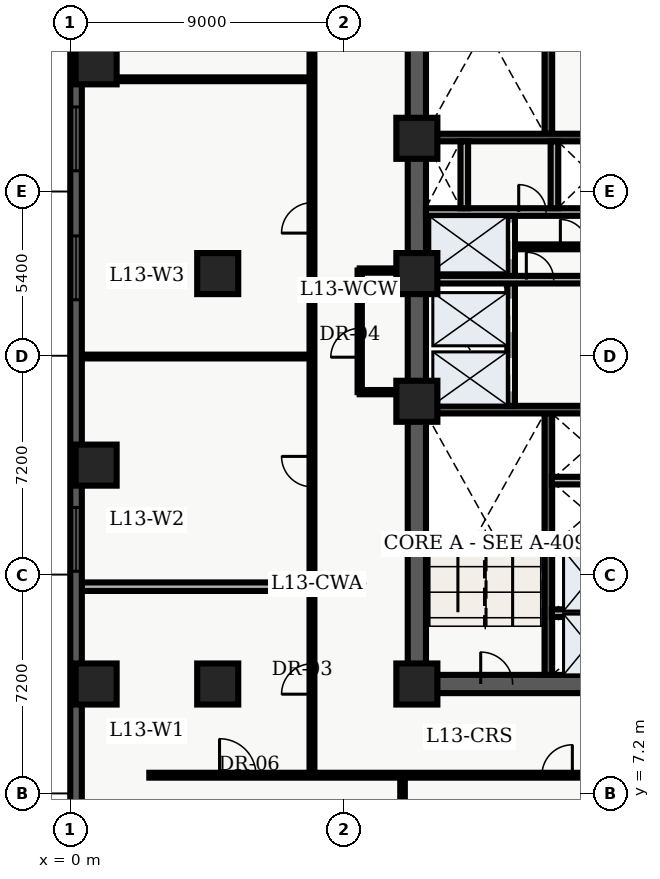
"""IFC4 building model, lengths in metres.
Left out: names, types, materials, properties, quantities, classifications, styles, units other than length and angle.
Written with IfcOpenShell. Run it as: python <this file> out.ifc"""

import sys

from ifc_helpers import new_model, entity, si_unit, converted_unit, direction, frame, origin_with_axes, origin_2d_with_axis, place, context, subcontext, project, spatial, polyline, rectangle, outline, extrude, element, fill, save


model = new_model("IFC4")
c1 = context("Model", 3, precision=1e-05, world=origin_with_axes(), true_north=direction((0.0, 1.0)))
c2 = subcontext(c1, "Body", "Model", "MODEL_VIEW")
j1 = project(units=[si_unit("LENGTHUNIT", "METRE"), converted_unit("PLANEANGLEUNIT", "DEGREE", entity("IfcPlaneAngleMeasure", 0.017), si_unit("PLANEANGLEUNIT", "RADIAN"), dimensions=[0, 0, 0, 0, 0, 0, 0])], contexts=[c1])
p1 = place(None, origin_with_axes())
s1 = spatial("IfcSite", under=j1, at=p1, CompositionType="ELEMENT")
p2 = place(p1, origin_with_axes())
s2 = spatial("IfcBuilding", under=s1, at=p2, CompositionType="ELEMENT")
p3 = place(p2, frame((0.0, 0.0, 56.1), z_axis=(0.0, 0.0, 1.0), x_axis=(1.0, 0.0, 0.0)))
s3 = spatial("IfcBuildingStorey", under=s2, at=p3, CompositionType="ELEMENT", Elevation=56.1)
p4 = place(p3, frame((11.4, 10.8, 0.0), z_axis=(0.0, 0.0, 1.0), x_axis=(0.0, 1.0, 0.0)))
e1 = element("IfcWall", 1, at=p4, inside=s3, PredefinedType="SHEAR", context=c2, shape_type="SweptSolid", body=[
    extrude(outline(polyline([(0.0, -0.3), (27.0, -0.3), (27.0, 0.3), (0.0, 0.3), (0.0, -0.3)])), origin_with_axes(), (0.0, 0.0, 1.0), 3.66),
])
p5 = place(p3, frame((11.4, 10.8, 0.0), z_axis=(0.0, 0.0, 1.0), x_axis=(1.0, 0.0, 0.0)))
e2 = element("IfcWall", 2, at=p5, inside=s3, PredefinedType="SHEAR", context=c2, shape_type="SweptSolid", body=[
    extrude(outline(polyline([(0.0, -0.3), (7.2, -0.3), (7.2, 0.3), (0.0, 0.3), (0.0, -0.3)])), origin_with_axes(), (0.0, 0.0, 1.0), 3.66),
])
p6 = place(p5, frame((2.625, 0.0, 0.0), z_axis=(0.0, 0.0, 1.0), x_axis=(1.0, 0.0, 0.0)))
e3 = element("IfcOpeningElement", 3, at=p6, cuts=e2, PredefinedType="OPENING", context=c2, shape_type="SweptSolid", body=[
    extrude(rectangle(XDim=1.05, YDim=0.62, at=origin_2d_with_axis()), origin_with_axes(), (0.0, 0.0, 1.0), 2.15),
])
p7 = place(p3, frame((15.725, 11.1, 0.0), z_axis=(0.0, 0.0, 1.0), x_axis=(0.0, 1.0, 0.0)))
e4 = element("IfcWall", 4, at=p7, inside=s3, PredefinedType="SHEAR", context=c2, shape_type="SweptSolid", body=[
    extrude(outline(polyline([(0.0, -0.125), (8.6, -0.125), (8.6, 0.125), (0.0, 0.125), (0.0, -0.125)])), origin_with_axes(), (0.0, 0.0, 1.0), 3.66),
])
p8 = place(p3, frame((11.7, 19.825, 0.0), z_axis=(0.0, 0.0, 1.0), x_axis=(1.0, 0.0, 0.0)))
e5 = element("IfcWall", 5, at=p8, inside=s3, PredefinedType="SHEAR", context=c2, shape_type="SweptSolid", body=[
    extrude(outline(polyline([(0.0, -0.125), (6.6, -0.125), (6.6, 0.125), (0.0, 0.125), (0.0, -0.125)])), origin_with_axes(), (0.0, 0.0, 1.0), 3.66),
])
p9 = place(p3, frame((15.725, 28.9, 0.0), z_axis=(0.0, 0.0, 1.0), x_axis=(0.0, 1.0, 0.0)))
e6 = element("IfcWall", 6, at=p9, inside=s3, PredefinedType="SHEAR", context=c2, shape_type="SweptSolid", body=[
    extrude(outline(polyline([(0.0, -0.125), (8.6, -0.125), (8.6, 0.125), (0.0, 0.125), (0.0, -0.125)])), origin_with_axes(), (0.0, 0.0, 1.0), 3.66),
])
p10 = place(p3, frame((11.7, 28.775, 0.0), z_axis=(0.0, 0.0, 1.0), x_axis=(1.0, 0.0, 0.0)))
e7 = element("IfcWall", 7, at=p10, inside=s3, PredefinedType="SHEAR", context=c2, shape_type="SweptSolid", body=[
    extrude(outline(polyline([(0.0, -0.125), (6.6, -0.125), (6.6, 0.125), (0.0, 0.125), (0.0, -0.125)])), origin_with_axes(), (0.0, 0.0, 1.0), 3.66),
])
p11 = place(p3, frame((14.5, 19.95, 0.0), z_axis=(0.0, 0.0, 1.0), x_axis=(0.0, 1.0, 0.0)))
e8 = element("IfcWall", 8, at=p11, inside=s3, PredefinedType="SOLIDWALL", context=c2, shape_type="SweptSolid", body=[
    extrude(outline(polyline([(0.0, -0.125), (6.25, -0.125), (6.25, 0.125), (0.0, 0.125), (0.0, -0.125)])), origin_with_axes(), (0.0, 0.0, 1.0), 2.7),
])
p12 = place(p11, frame((1.025, 0.0, 0.0), z_axis=(0.0, 0.0, 1.0), x_axis=(1.0, 0.0, 0.0)))
e9 = element("IfcOpeningElement", 9, at=p12, cuts=e8, PredefinedType="OPENING", context=c2, shape_type="SweptSolid", body=[
    extrude(rectangle(XDim=1.1, YDim=0.27, at=origin_2d_with_axis()), origin_with_axes(), (0.0, 0.0, 1.0), 2.15),
])
p13 = place(p11, frame((2.975, 0.0, 0.0), z_axis=(0.0, 0.0, 1.0), x_axis=(1.0, 0.0, 0.0)))
e10 = element("IfcOpeningElement", 10, at=p13, cuts=e8, PredefinedType="OPENING", context=c2, shape_type="SweptSolid", body=[
    extrude(rectangle(XDim=1.1, YDim=0.27, at=origin_2d_with_axis()), origin_with_axes(), (0.0, 0.0, 1.0), 2.15),
])
p14 = place(p11, frame((5.425, 0.0, 0.0), z_axis=(0.0, 0.0, 1.0), x_axis=(1.0, 0.0, 0.0)))
e11 = element("IfcOpeningElement", 11, at=p14, cuts=e8, PredefinedType="OPENING", context=c2, shape_type="SweptSolid", body=[
    extrude(rectangle(XDim=1.2, YDim=0.27, at=origin_2d_with_axis()), origin_with_axes(), (0.0, 0.0, 1.0), 2.15),
])
p15 = place(p3, frame((11.7, 24.1, 0.0), z_axis=(0.0, 0.0, 1.0), x_axis=(1.0, 0.0, 0.0)))
e12 = element("IfcWall", 12, at=p15, inside=s3, PredefinedType="SOLIDWALL", context=c2, shape_type="SweptSolid", body=[
    extrude(outline(polyline([(0.0, -0.125), (6.6, -0.125), (6.6, 0.125), (0.0, 0.125), (0.0, -0.125)])), origin_with_axes(), (0.0, 0.0, 1.0), 2.7),
])
p16 = place(p15, frame((3.75, 0.0, 0.0), z_axis=(0.0, 0.0, 1.0), x_axis=(1.0, 0.0, 0.0)))
e13 = element("IfcOpeningElement", 13, at=p16, cuts=e12, PredefinedType="OPENING", context=c2, shape_type="SweptSolid", body=[
    extrude(rectangle(XDim=0.9, YDim=0.27, at=origin_2d_with_axis()), origin_with_axes(), (0.0, 0.0, 1.0), 2.15),
])
p17 = place(p3, frame((11.7, 26.325, 0.0), z_axis=(0.0, 0.0, 1.0), x_axis=(1.0, 0.0, 0.0)))
e14 = element("IfcWall", 14, at=p17, inside=s3, PredefinedType="SOLIDWALL", context=c2, shape_type="SweptSolid", body=[
    extrude(outline(polyline([(0.0, -0.125), (6.6, -0.125), (6.6, 0.125), (0.0, 0.125), (0.0, -0.125)])), origin_with_axes(), (0.0, 0.0, 1.0), 2.7),
])
p18 = place(p17, frame((3.5, 0.0, 0.0), z_axis=(0.0, 0.0, 1.0), x_axis=(1.0, 0.0, 0.0)))
e15 = element("IfcOpeningElement", 15, at=p18, cuts=e14, PredefinedType="OPENING", context=c2, shape_type="SweptSolid", body=[
    extrude(rectangle(XDim=0.9, YDim=0.27, at=origin_2d_with_axis()), origin_with_axes(), (0.0, 0.0, 1.0), 2.15),
])
for number, where, z_axis, x_axis in (
    (16, (12.96, 26.45, 0.0), (0.0, 0.0, 1.0), (0.0, 1.0, 0.0)),
    (17, (15.925, 26.45, 0.0), (0.0, 0.0, 1.0), (0.0, 1.0, 0.0)),
):
    element("IfcWall", number, at=place(p3, frame(where, z_axis=z_axis, x_axis=x_axis)), inside=s3, PredefinedType="SOLIDWALL", context=c2, shape_type="SweptSolid", body=[
        extrude(outline(polyline([(0.0, -0.125), (2.2, -0.125), (2.2, 0.125), (0.0, 0.125), (0.0, -0.125)])), origin_with_axes(), (0.0, 0.0, 1.0), 2.7),
    ])
for number, where, z_axis, x_axis in (
    (18, (11.4, 10.8, 0.0), (0.0, 0.0, 1.0), (1.0, 0.0, 0.0)),
    (19, (11.4, 20.1, 0.0), (0.0, 0.0, 1.0), (1.0, 0.0, 0.0)),
    (20, (11.4, 24.3, 0.0), (0.0, 0.0, 1.0), (1.0, 0.0, 0.0)),
    (21, (11.4, 28.75, 0.0), (0.0, 0.0, 1.0), (1.0, 0.0, 0.0)),
    (22, (4.85, 10.8, 0.0), (0.0, 0.0, 1.0), (1.0, 0.0, 0.0)),
    (23, (4.85, 24.3, 0.0), (0.0, 0.0, 1.0), (1.0, 0.0, 0.0)),
    (24, (0.85, 10.8, 0.0), (0.0, 0.0, 1.0), (1.0, 0.0, 0.0)),
    (25, (0.85, 18.0, 0.0), (0.0, 0.0, 1.0), (1.0, 0.0, 0.0)),
    (26, (0.85, 31.2, 0.0), (0.0, 0.0, 1.0), (1.0, 0.0, 0.0)),
):
    element("IfcColumn", number, at=place(p3, frame(where, z_axis=z_axis, x_axis=x_axis)), inside=s3, PredefinedType="COLUMN", context=c2, shape_type="SweptSolid", body=[
        extrude(rectangle(XDim=1.35, YDim=1.35, at=origin_2d_with_axis()), origin_with_axes(), (0.0, 0.0, 1.0), 3.9),
    ])
p19 = place(p3, frame((14.62, 25.18, 0.0), z_axis=(0.0, 0.0, 1.0), x_axis=(1.0, 0.0, 0.0)))
e27 = element("IfcWall", 27, at=p19, inside=s3, PredefinedType="PARTITIONING", context=c2, shape_type="SweptSolid", body=[
    extrude(outline(polyline([(0.0, -0.08), (3.68, -0.08), (3.68, 0.08), (0.0, 0.08), (0.0, -0.08)])), origin_with_axes(), (0.0, 0.0, 1.0), 2.7),
])
p20 = place(p19, frame((1.95, 0.0, 0.0), z_axis=(0.0, 0.0, 1.0), x_axis=(1.0, 0.0, 0.0)))
e28 = element("IfcOpeningElement", 28, at=p20, cuts=e27, PredefinedType="OPENING", context=c2, shape_type="SweptSolid", body=[
    extrude(rectangle(XDim=0.9, YDim=0.18, at=origin_2d_with_axis()), origin_with_axes(), (0.0, 0.0, 1.0), 2.15),
])
for number, where, z_axis, x_axis in (
    (29, (15.84, 13.13, 0.0), (0.0, 0.0, 1.0), (1.0, 0.0, 0.0)),
    (30, (15.84, 15.29, 0.0), (0.0, 0.0, 1.0), (1.0, 0.0, 0.0)),
    (31, (15.84, 17.49, 0.0), (0.0, 0.0, 1.0), (1.0, 0.0, 0.0)),
):
    element("IfcWall", number, at=place(p3, frame(where, z_axis=z_axis, x_axis=x_axis)), inside=s3, PredefinedType="SOLIDWALL", context=c2, shape_type="SweptSolid", body=[
        extrude(outline(polyline([(0.0, -0.125), (2.46, -0.125), (2.46, 0.125), (0.0, 0.125), (0.0, -0.125)])), origin_with_axes(), (0.0, 0.0, 1.0), 2.7),
    ])
p21 = place(p3, frame((9.52, 20.4, 0.0), z_axis=(0.0, 0.0, 1.0), x_axis=(0.0, 1.0, 0.0)))
e32 = element("IfcWall", 32, at=p21, inside=s3, PredefinedType="PARTITIONING", context=c2, shape_type="SweptSolid", body=[
    extrude(outline(polyline([(0.0, -0.07), (4.0, -0.07), (4.0, 0.07), (0.0, 0.07), (0.0, -0.07)])), origin_with_axes(), (0.0, 0.0, 1.0), 2.7),
])
p22 = place(p21, frame((1.625, 0.0, 0.0), z_axis=(0.0, 0.0, 1.0), x_axis=(1.0, 0.0, 0.0)))
e33 = element("IfcOpeningElement", 33, at=p22, cuts=e32, PredefinedType="OPENING", context=c2, shape_type="SweptSolid", body=[
    extrude(rectangle(XDim=0.95, YDim=0.16, at=origin_2d_with_axis()), origin_with_axes(), (0.0, 0.0, 1.0), 2.15),
])
for number, where, z_axis, x_axis in (
    (34, (9.52, 20.4, 0.0), (0.0, 0.0, 1.0), (1.0, 0.0, 0.0)),
    (35, (9.52, 24.4, 0.0), (0.0, 0.0, 1.0), (1.0, 0.0, 0.0)),
):
    element("IfcWall", number, at=place(p3, frame(where, z_axis=z_axis, x_axis=x_axis)), inside=s3, PredefinedType="PARTITIONING", context=c2, shape_type="SweptSolid", body=[
        extrude(outline(polyline([(0.0, -0.07), (1.58, -0.07), (1.58, 0.07), (0.0, 0.07), (0.0, -0.07)])), origin_with_axes(), (0.0, 0.0, 1.0), 2.7),
    ])
p23 = place(p3, frame((2.6, 7.8, 0.0), z_axis=(0.0, 0.0, 1.0), x_axis=(1.0, 0.0, 0.0)))
e36 = element("IfcWall", 36, at=p23, inside=s3, PredefinedType="PARTITIONING", context=c2, shape_type="SweptSolid", body=[
    extrude(outline(polyline([(0.0, -0.08), (18.55, -0.08), (18.55, 0.08), (0.0, 0.08), (0.0, -0.08)])), origin_with_axes(), (0.0, 0.0, 1.0), 2.7),
])
p24 = place(p23, frame((2.91, 0.0, 0.0), z_axis=(0.0, 0.0, 1.0), x_axis=(1.0, 0.0, 0.0)))
e37 = element("IfcOpeningElement", 37, at=p24, cuts=e36, PredefinedType="OPENING", context=c2, shape_type="SweptSolid", body=[
    extrude(rectangle(XDim=1.2, YDim=0.18, at=origin_2d_with_axis()), origin_with_axes(), (0.0, 0.0, 1.0), 2.2),
])
p25 = place(p23, frame((13.415, 0.0, 0.0), z_axis=(0.0, 0.0, 1.0), x_axis=(1.0, 0.0, 0.0)))
e38 = element("IfcOpeningElement", 38, at=p25, cuts=e36, PredefinedType="OPENING", context=c2, shape_type="SweptSolid", body=[
    extrude(rectangle(XDim=1.0, YDim=0.18, at=origin_2d_with_axis()), origin_with_axes(), (0.0, 0.0, 1.0), 2.15),
])
p26 = place(p3, frame((7.95, 7.8, 0.0), z_axis=(0.0, 0.0, 1.0), x_axis=(0.0, 1.0, 0.0)))
e39 = element("IfcWall", 39, at=p26, inside=s3, PredefinedType="PARTITIONING", context=c2, shape_type="SweptSolid", body=[
    extrude(outline(polyline([(0.0, -0.08), (32.7, -0.08), (32.7, 0.08), (0.0, 0.08), (0.0, -0.08)])), origin_with_axes(), (0.0, 0.0, 1.0), 2.7),
])
p27 = place(p26, frame((3.166, 0.0, 0.0), z_axis=(0.0, 0.0, 1.0), x_axis=(1.0, 0.0, 0.0)))
e40 = element("IfcOpeningElement", 40, at=p27, cuts=e39, PredefinedType="OPENING", context=c2, shape_type="SweptSolid", body=[
    extrude(rectangle(XDim=1.0, YDim=0.18, at=origin_2d_with_axis()), origin_with_axes(), (0.0, 0.0, 1.0), 2.15),
])
p28 = place(p26, frame((9.986, 0.0, 0.0), z_axis=(0.0, 0.0, 1.0), x_axis=(1.0, 0.0, 0.0)))
e41 = element("IfcOpeningElement", 41, at=p28, cuts=e39, PredefinedType="OPENING", context=c2, shape_type="SweptSolid", body=[
    extrude(rectangle(XDim=1.0, YDim=0.18, at=origin_2d_with_axis()), origin_with_axes(), (0.0, 0.0, 1.0), 2.15),
])
p29 = place(p26, frame((18.332, 0.0, 0.0), z_axis=(0.0, 0.0, 1.0), x_axis=(1.0, 0.0, 0.0)))
e42 = element("IfcOpeningElement", 42, at=p29, cuts=e39, PredefinedType="OPENING", context=c2, shape_type="SweptSolid", body=[
    extrude(rectangle(XDim=1.0, YDim=0.18, at=origin_2d_with_axis()), origin_with_axes(), (0.0, 0.0, 1.0), 2.15),
])
p30 = place(p26, frame((25.088, 0.0, 0.0), z_axis=(0.0, 0.0, 1.0), x_axis=(1.0, 0.0, 0.0)))
e43 = element("IfcOpeningElement", 43, at=p30, cuts=e39, PredefinedType="OPENING", context=c2, shape_type="SweptSolid", body=[
    extrude(rectangle(XDim=1.0, YDim=0.18, at=origin_2d_with_axis()), origin_with_axes(), (0.0, 0.0, 1.0), 2.15),
])
p31 = place(p26, frame((29.927, 0.0, 0.0), z_axis=(0.0, 0.0, 1.0), x_axis=(1.0, 0.0, 0.0)))
e44 = element("IfcOpeningElement", 44, at=p31, cuts=e39, PredefinedType="OPENING", context=c2, shape_type="SweptSolid", body=[
    extrude(rectangle(XDim=1.0, YDim=0.18, at=origin_2d_with_axis()), origin_with_axes(), (0.0, 0.0, 1.0), 2.15),
])
p32 = place(p3, frame((0.375, 14.001, 0.0), z_axis=(0.0, 0.0, 1.0), x_axis=(1.0, 0.0, 0.0)))
e45 = element("IfcWall", 45, at=p32, inside=s3, PredefinedType="PARTITIONING", context=c2, shape_type="SweptSolid", body=[
    extrude(outline(polyline([(0.0, -0.14), (7.455, -0.14), (7.455, 0.14), (0.0, 0.14), (0.0, -0.14)])), origin_with_axes(), (0.0, 0.0, 1.0), 2.7),
])
for number, where, z_axis, x_axis in (
    (46, (0.375, 21.572, 0.0), (0.0, 0.0, 1.0), (1.0, 0.0, 0.0)),
    (47, (0.375, 30.692, 0.0), (0.0, 0.0, 1.0), (1.0, 0.0, 0.0)),
):
    element("IfcWall", number, at=place(p3, frame(where, z_axis=z_axis, x_axis=x_axis)), inside=s3, PredefinedType="PARTITIONING", context=c2, shape_type="SweptSolid", body=[
        extrude(outline(polyline([(0.0, -0.062), (7.455, -0.062), (7.455, 0.062), (0.0, 0.062), (0.0, -0.062)])), origin_with_axes(), (0.0, 0.0, 1.0), 2.7),
    ])
p33 = place(p3, frame((10.929, 0.36, 0.0), z_axis=(0.0, 0.0, 1.0), x_axis=(0.0, 1.0, 0.0)))
e48 = element("IfcWall", 48, at=p33, inside=s3, PredefinedType="PARTITIONING", context=c2, shape_type="SweptSolid", body=[
    extrude(outline(polyline([(0.0, -0.075), (7.34, -0.075), (7.34, 0.075), (0.0, 0.075), (0.0, -0.075)])), origin_with_axes(), (0.0, 0.0, 1.0), 2.7),
])
p34 = place(p3, frame((0.19, 2.78, 0.0), z_axis=(0.0, 0.0, 1.0), x_axis=(0.0, 1.0, 0.0)))
e49 = element("IfcWall", 49, at=p34, inside=s3, PredefinedType="SOLIDWALL", context=c2, shape_type="SweptSolid", body=[
    extrude(outline(polyline([(0.0, -0.19), (43.42, -0.19), (43.42, 0.19), (0.0, 0.19), (0.0, -0.19)])), origin_with_axes(), (0.0, 0.0, 1.0), 3.66),
])
p35 = place(p34, frame((2.946, 0.0, 0.45), z_axis=(0.0, 0.0, 1.0), x_axis=(1.0, 0.0, 0.0)))
e50 = element("IfcOpeningElement", 50, at=p35, cuts=e49, PredefinedType="OPENING", context=c2, shape_type="SweptSolid", body=[
    extrude(rectangle(XDim=2.1, YDim=0.4, at=origin_2d_with_axis()), origin_with_axes(), (0.0, 0.0, 1.0), 2.2),
])
p36 = place(p34, frame((12.778, 0.0, 0.45), z_axis=(0.0, 0.0, 1.0), x_axis=(1.0, 0.0, 0.0)))
e51 = element("IfcOpeningElement", 51, at=p36, cuts=e49, PredefinedType="OPENING", context=c2, shape_type="SweptSolid", body=[
    extrude(rectangle(XDim=2.1, YDim=0.4, at=origin_2d_with_axis()), origin_with_axes(), (0.0, 0.0, 1.0), 2.2),
])
p37 = place(p34, frame((21.71, 0.0, 0.45), z_axis=(0.0, 0.0, 1.0), x_axis=(1.0, 0.0, 0.0)))
e52 = element("IfcOpeningElement", 52, at=p37, cuts=e49, PredefinedType="OPENING", context=c2, shape_type="SweptSolid", body=[
    extrude(rectangle(XDim=2.1, YDim=0.4, at=origin_2d_with_axis()), origin_with_axes(), (0.0, 0.0, 1.0), 2.2),
])
p38 = place(p34, frame((25.951, 0.0, 0.45), z_axis=(0.0, 0.0, 1.0), x_axis=(1.0, 0.0, 0.0)))
e53 = element("IfcOpeningElement", 53, at=p38, cuts=e49, PredefinedType="OPENING", context=c2, shape_type="SweptSolid", body=[
    extrude(rectangle(XDim=2.1, YDim=0.4, at=origin_2d_with_axis()), origin_with_axes(), (0.0, 0.0, 1.0), 2.2),
])
p39 = place(p34, frame((30.642, 0.0, 0.45), z_axis=(0.0, 0.0, 1.0), x_axis=(1.0, 0.0, 0.0)))
e54 = element("IfcOpeningElement", 54, at=p39, cuts=e49, PredefinedType="OPENING", context=c2, shape_type="SweptSolid", body=[
    extrude(rectangle(XDim=2.1, YDim=0.4, at=origin_2d_with_axis()), origin_with_axes(), (0.0, 0.0, 1.0), 2.2),
])
p40 = place(p34, frame((40.024, 0.0, 0.45), z_axis=(0.0, 0.0, 1.0), x_axis=(1.0, 0.0, 0.0)))
e55 = element("IfcOpeningElement", 55, at=p40, cuts=e49, PredefinedType="OPENING", context=c2, shape_type="SweptSolid", body=[
    extrude(rectangle(XDim=2.1, YDim=0.4, at=origin_2d_with_axis()), origin_with_axes(), (0.0, 0.0, 1.0), 2.2),
])
p41 = place(p11, frame((1.025, 0.0, 0.0), z_axis=(0.0, 0.0, 1.0), x_axis=(1.0, 0.0, 0.0)))
e56 = element("IfcDoor", 56, at=p41, inside=s3, OperationType="SLIDING_TO_LEFT", PredefinedType="DOOR", context=c2, shape_type="SweptSolid", body=[
    extrude(rectangle(XDim=1.1, YDim=0.09, at=origin_2d_with_axis()), origin_with_axes(), (0.0, 0.0, 1.0), 2.15),
])
fill(e9, e56)
p42 = place(p11, frame((2.975, 0.0, 0.0), z_axis=(0.0, 0.0, 1.0), x_axis=(1.0, 0.0, 0.0)))
e57 = element("IfcDoor", 57, at=p42, inside=s3, OperationType="SLIDING_TO_RIGHT", PredefinedType="DOOR", context=c2, shape_type="SweptSolid", body=[
    extrude(rectangle(XDim=1.1, YDim=0.09, at=origin_2d_with_axis()), origin_with_axes(), (0.0, 0.0, 1.0), 2.15),
])
fill(e10, e57)
p43 = place(p11, frame((5.425, 0.0, 0.0), z_axis=(0.0, 0.0, 1.0), x_axis=(1.0, 0.0, 0.0)))
e58 = element("IfcDoor", 58, at=p43, inside=s3, OperationType="DOUBLE_DOOR_SLIDING", PredefinedType="DOOR", context=c2, shape_type="SweptSolid", body=[
    extrude(rectangle(XDim=1.2, YDim=0.09, at=origin_2d_with_axis()), origin_with_axes(), (0.0, 0.0, 1.0), 2.15),
])
fill(e11, e58)
p44 = place(p5, frame((2.625, 0.0, 0.0), z_axis=(0.0, 0.0, 1.0), x_axis=(1.0, 0.0, 0.0)))
e59 = element("IfcDoor", 59, at=p44, inside=s3, OperationType="SINGLE_SWING_LEFT", PredefinedType="DOOR", context=c2, shape_type="SweptSolid", body=[
    extrude(rectangle(XDim=1.05, YDim=0.09, at=origin_2d_with_axis()), origin_with_axes(), (0.0, 0.0, 1.0), 2.15),
])
fill(e3, e59)
p45 = place(p17, frame((3.5, 0.0, 0.0), z_axis=(0.0, 0.0, 1.0), x_axis=(1.0, 0.0, 0.0)))
e60 = element("IfcDoor", 60, at=p45, inside=s3, OperationType="SINGLE_SWING_LEFT", PredefinedType="DOOR", context=c2, shape_type="SweptSolid", body=[
    extrude(rectangle(XDim=0.9, YDim=0.09, at=origin_2d_with_axis()), origin_with_axes(), (0.0, 0.0, 1.0), 2.15),
])
fill(e15, e60)
p46 = place(p15, frame((3.75, 0.0, 0.0), z_axis=(0.0, 0.0, 1.0), x_axis=(1.0, 0.0, 0.0)))
e61 = element("IfcDoor", 61, at=p46, inside=s3, OperationType="SINGLE_SWING_LEFT", PredefinedType="DOOR", context=c2, shape_type="SweptSolid", body=[
    extrude(rectangle(XDim=0.9, YDim=0.09, at=origin_2d_with_axis()), origin_with_axes(), (0.0, 0.0, 1.0), 2.15),
])
fill(e13, e61)
p47 = place(p19, frame((1.95, 0.0, 0.0), z_axis=(0.0, 0.0, 1.0), x_axis=(1.0, 0.0, 0.0)))
e62 = element("IfcDoor", 62, at=p47, inside=s3, OperationType="SINGLE_SWING_LEFT", PredefinedType="DOOR", context=c2, shape_type="SweptSolid", body=[
    extrude(rectangle(XDim=0.9, YDim=0.09, at=origin_2d_with_axis()), origin_with_axes(), (0.0, 0.0, 1.0), 2.15),
])
fill(e28, e62)
p48 = place(p21, frame((1.625, 0.0, 0.0), z_axis=(0.0, 0.0, 1.0), x_axis=(1.0, 0.0, 0.0)))
e63 = element("IfcDoor", 63, at=p48, inside=s3, OperationType="SINGLE_SWING_LEFT", PredefinedType="DOOR", context=c2, shape_type="SweptSolid", body=[
    extrude(rectangle(XDim=0.95, YDim=0.084, at=origin_2d_with_axis()), origin_with_axes(), (0.0, 0.0, 1.0), 2.15),
])
fill(e33, e63)
p49 = place(p26, frame((3.166, 0.0, 0.0), z_axis=(0.0, 0.0, 1.0), x_axis=(1.0, 0.0, 0.0)))
e64 = element("IfcDoor", 64, at=p49, inside=s3, OperationType="SINGLE_SWING_LEFT", PredefinedType="DOOR", context=c2, shape_type="SweptSolid", body=[
    extrude(rectangle(XDim=1.0, YDim=0.09, at=origin_2d_with_axis()), origin_with_axes(), (0.0, 0.0, 1.0), 2.15),
])
fill(e40, e64)
p50 = place(p26, frame((9.986, 0.0, 0.0), z_axis=(0.0, 0.0, 1.0), x_axis=(1.0, 0.0, 0.0)))
e65 = element("IfcDoor", 65, at=p50, inside=s3, OperationType="SINGLE_SWING_RIGHT", PredefinedType="DOOR", context=c2, shape_type="SweptSolid", body=[
    extrude(rectangle(XDim=1.0, YDim=0.09, at=origin_2d_with_axis()), origin_with_axes(), (0.0, 0.0, 1.0), 2.15),
])
fill(e41, e65)
p51 = place(p26, frame((18.332, 0.0, 0.0), z_axis=(0.0, 0.0, 1.0), x_axis=(1.0, 0.0, 0.0)))
e66 = element("IfcDoor", 66, at=p51, inside=s3, OperationType="SINGLE_SWING_LEFT", PredefinedType="DOOR", context=c2, shape_type="SweptSolid", body=[
    extrude(rectangle(XDim=1.0, YDim=0.09, at=origin_2d_with_axis()), origin_with_axes(), (0.0, 0.0, 1.0), 2.15),
])
fill(e42, e66)
p52 = place(p23, frame((2.91, 0.0, 0.0), z_axis=(0.0, 0.0, 1.0), x_axis=(1.0, 0.0, 0.0)))
e67 = element("IfcDoor", 67, at=p52, inside=s3, OperationType="SINGLE_SWING_LEFT", PredefinedType="DOOR", context=c2, shape_type="SweptSolid", body=[
    extrude(rectangle(XDim=1.2, YDim=0.09, at=origin_2d_with_axis()), origin_with_axes(), (0.0, 0.0, 1.0), 2.2),
])
fill(e37, e67)
p53 = place(p23, frame((13.415, 0.0, 0.0), z_axis=(0.0, 0.0, 1.0), x_axis=(1.0, 0.0, 0.0)))
e68 = element("IfcDoor", 68, at=p53, inside=s3, OperationType="SINGLE_SWING_RIGHT", PredefinedType="DOOR", context=c2, shape_type="SweptSolid", body=[
    extrude(rectangle(XDim=1.0, YDim=0.09, at=origin_2d_with_axis()), origin_with_axes(), (0.0, 0.0, 1.0), 2.15),
])
fill(e38, e68)
p54 = place(p34, frame((12.778, 0.0, 0.45), z_axis=(0.0, 0.0, 1.0), x_axis=(1.0, 0.0, 0.0)))
e69 = element("IfcWindow", 69, at=p54, inside=s3, PredefinedType="WINDOW", context=c2, shape_type="SweptSolid", body=[
    extrude(rectangle(XDim=2.1, YDim=0.09, at=origin_2d_with_axis()), origin_with_axes(), (0.0, 0.0, 1.0), 2.2),
])
fill(e51, e69)
p55 = place(p34, frame((21.71, 0.0, 0.45), z_axis=(0.0, 0.0, 1.0), x_axis=(1.0, 0.0, 0.0)))
e70 = element("IfcWindow", 70, at=p55, inside=s3, PredefinedType="WINDOW", context=c2, shape_type="SweptSolid", body=[
    extrude(rectangle(XDim=2.1, YDim=0.09, at=origin_2d_with_axis()), origin_with_axes(), (0.0, 0.0, 1.0), 2.2),
])
fill(e52, e70)
p56 = place(p34, frame((25.951, 0.0, 0.45), z_axis=(0.0, 0.0, 1.0), x_axis=(1.0, 0.0, 0.0)))
e71 = element("IfcWindow", 71, at=p56, inside=s3, PredefinedType="WINDOW", context=c2, shape_type="SweptSolid", body=[
    extrude(rectangle(XDim=2.1, YDim=0.09, at=origin_2d_with_axis()), origin_with_axes(), (0.0, 0.0, 1.0), 2.2),
])
fill(e53, e71)
save(model, sys.argv[1])
